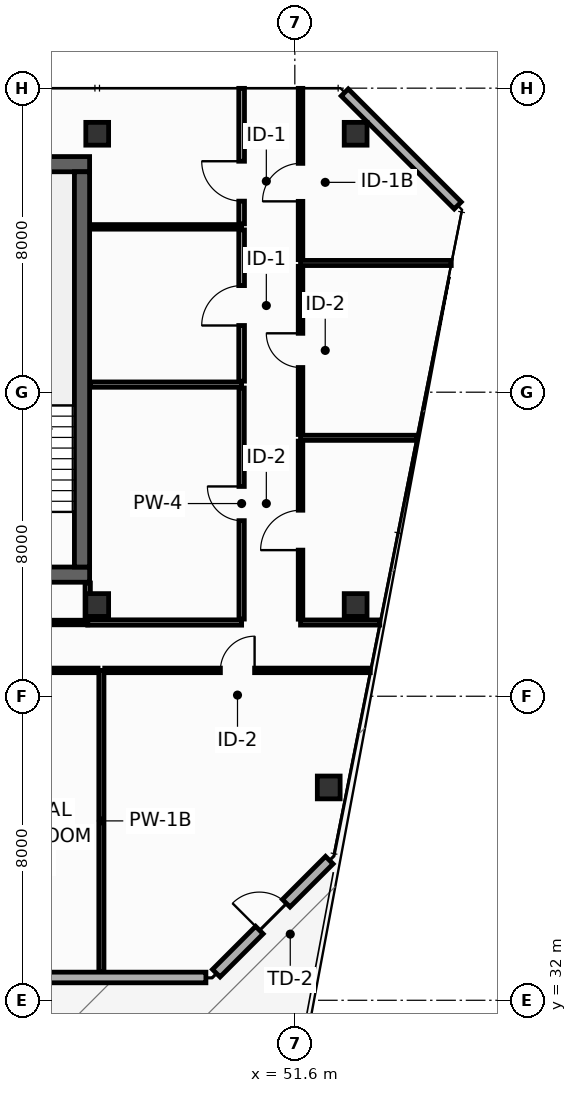
"""IFC4 building model, lengths in metres.
Left out: names, types, materials, properties, quantities, classifications, styles, units other than length and angle.
Written with IfcOpenShell. Run it as: python <this file> out.ifc"""

import sys

from ifc_helpers import new_model, si_unit, direction, frame, frame_2d, origin, origin_2d, place, context, subcontext, project, spatial, rectangle, hollow_rectangle, extrude, element, fill, save


model = new_model("IFC4")
c1 = context("Model", 3, precision=1e-05, world=origin(), true_north=direction((0.0, 1.0)))
c2 = subcontext(c1, "Body", "Model", "MODEL_VIEW")
j1 = project(units=[si_unit("LENGTHUNIT", "METRE"), si_unit("PLANEANGLEUNIT", "RADIAN")], contexts=[c1])
p1 = place(None, origin())
s1 = spatial("IfcSite", under=j1, at=p1, CompositionType="ELEMENT")
p2 = place(p1, origin())
s2 = spatial("IfcBuilding", under=s1, at=p2, CompositionType="ELEMENT")
p3 = place(p2, frame((0.0, 0.0, 295.2)))
s3 = spatial("IfcBuildingStorey", under=s2, at=p3, CompositionType="ELEMENT", Elevation=295.2)
p4 = place(p3, frame((13.7, 43.2, 0.0), z_axis=(0.0, 0.0, 1.0), x_axis=(1.0, 0.0, 0.0)))
e1 = element("IfcWall", 1, at=p4, inside=s3, PredefinedType="SHEAR", context=c2, shape_type="SweptSolid", body=[
    extrude(rectangle(XDim=32.5, YDim=0.4, at=frame_2d((16.25, 0.0))), origin(), (0.0, 0.0, 1.0), 3.55),
])
p5 = place(p4, frame((5.4, 0.0, 0.0)))
e2 = element("IfcOpeningElement", 2, at=p5, cuts=e1, PredefinedType="OPENING", context=c2, shape_type="SweptSolid", body=[
    extrude(rectangle(XDim=1.1, YDim=2.15, at=frame_2d((0.55, 1.075))), frame((0.0, 0.21, 0.0), z_axis=(0.0, -1.0, 0.0), x_axis=(1.0, 0.0, 0.0)), (0.0, 0.0, 1.0), 0.42),
])
p6 = place(p4, frame((25.6, 0.0, 0.0)))
e3 = element("IfcOpeningElement", 3, at=p6, cuts=e1, PredefinedType="OPENING", context=c2, shape_type="SweptSolid", body=[
    extrude(rectangle(XDim=1.1, YDim=2.15, at=frame_2d((0.55, 1.075))), frame((0.0, 0.21, 0.0), z_axis=(0.0, -1.0, 0.0), x_axis=(1.0, 0.0, 0.0)), (0.0, 0.0, 1.0), 0.42),
])
p7 = place(p3, frame((13.7, 54.0, 0.0), z_axis=(0.0, 0.0, 1.0), x_axis=(1.0, 0.0, 0.0)))
e4 = element("IfcWall", 4, at=p7, inside=s3, PredefinedType="SHEAR", context=c2, shape_type="SweptSolid", body=[
    extrude(rectangle(XDim=32.5, YDim=0.4, at=frame_2d((16.25, 0.0))), origin(), (0.0, 0.0, 1.0), 3.55),
])
p8 = place(p3, frame((46.0, 43.4, 0.0), z_axis=(0.0, 0.0, 1.0), x_axis=(0.0, 1.0, 0.0)))
e5 = element("IfcWall", 5, at=p8, inside=s3, PredefinedType="SHEAR", context=c2, shape_type="SweptSolid", body=[
    extrude(rectangle(XDim=10.4, YDim=0.4, at=frame_2d((5.2, 0.0))), origin(), (0.0, 0.0, 1.0), 3.55),
])
for number, where, z_axis, x_axis in (
    (6, (46.4, 54.8, 0.0), (0.0, 0.0, 1.0), (1.0, 0.0, 0.0)),
    (7, (53.2, 54.8, 0.0), (0.0, 0.0, 1.0), (1.0, 0.0, 0.0)),
    (8, (46.4, 42.4, 0.0), (0.0, 0.0, 1.0), (1.0, 0.0, 0.0)),
    (9, (53.2, 42.4, 0.0), (0.0, 0.0, 1.0), (1.0, 0.0, 0.0)),
    (10, (52.492, 37.6, 0.0), (0.0, 0.0, 1.0), (1.0, 0.0, 0.0)),
):
    element("IfcColumn", number, at=place(p3, frame(where, z_axis=z_axis, x_axis=x_axis)), inside=s3, PredefinedType="COLUMN", context=c2, shape_type="SweptSolid", body=[
        extrude(hollow_rectangle(XDim=0.6, YDim=0.6, WallThickness=0.028, at=origin_2d()), origin(), (0.0, 0.0, 1.0), 3.8),
    ])
p9 = place(p3, frame((35.66, 32.6, 0.0), z_axis=(0.0, 0.0, 1.0), x_axis=(1.0, 0.0, 0.0)))
e11 = element("IfcWall", 11, at=p9, inside=s3, PredefinedType="STANDARD", context=c2, shape_type="SweptSolid", body=[
    extrude(rectangle(XDim=13.6, YDim=0.28, at=frame_2d((6.8, 0.0))), origin(), (0.0, 0.0, 1.0), 3.55),
])
p10 = place(p9, frame((6.3, 0.0, 0.0)))
e12 = element("IfcOpeningElement", 12, at=p10, cuts=e11, PredefinedType="OPENING", context=c2, shape_type="SweptSolid", body=[
    extrude(rectangle(XDim=1.0, YDim=2.2, at=frame_2d((0.5, 1.1))), frame((0.0, 0.15, 0.0), z_axis=(0.0, -1.0, 0.0), x_axis=(1.0, 0.0, 0.0)), (0.0, 0.0, 1.0), 0.3),
])
p11 = place(p3, frame((49.533, 32.713, 0.0), z_axis=(0.0, 0.0, 1.0), x_axis=(0.70707775441, 0.707135806771, 0.0)))
e13 = element("IfcWall", 13, at=p11, inside=s3, PredefinedType="STANDARD", context=c2, shape_type="SweptSolid", body=[
    extrude(rectangle(XDim=4.206, YDim=0.28, at=frame_2d((2.103, 0.0))), origin(), (0.0, 0.0, 1.0), 3.55),
])
p12 = place(p11, frame((1.603, 0.0, 0.0)))
e14 = element("IfcOpeningElement", 14, at=p12, cuts=e13, PredefinedType="OPENING", context=c2, shape_type="SweptSolid", body=[
    extrude(rectangle(XDim=1.0, YDim=2.2, at=frame_2d((0.5, 1.1))), frame((0.0, 0.15, 0.0), z_axis=(0.0, -1.0, 0.0), x_axis=(1.0, 0.0, 0.0)), (0.0, 0.0, 1.0), 0.3),
])
p13 = place(p3, frame((55.887, 52.913, 0.0), z_axis=(0.0, 0.0, 1.0), x_axis=(-0.707106781187, 0.707106781187, 0.0)))
e15 = element("IfcWall", 15, at=p13, inside=s3, PredefinedType="STANDARD", context=c2, shape_type="SweptSolid", body=[
    extrude(rectangle(XDim=4.206, YDim=0.26, at=frame_2d((2.103, 0.0))), origin(), (0.0, 0.0, 1.0), 3.55),
])
p14 = place(p3, frame((46.15, 41.94, 0.0), z_axis=(0.0, 0.0, 1.0), x_axis=(1.0, 0.0, 0.0)))
e16 = element("IfcWall", 16, at=p14, inside=s3, PredefinedType="PARTITIONING", context=c2, shape_type="SweptSolid", body=[
    extrude(rectangle(XDim=4.05, YDim=0.14, at=frame_2d((2.025, 0.0))), origin(), (0.0, 0.0, 1.0), 3.55),
])
p15 = place(p3, frame((46.15, 42.03, 0.0), z_axis=(0.0, 0.0, 1.0), x_axis=(0.0, 1.0, 0.0)))
e17 = element("IfcWall", 17, at=p15, inside=s3, PredefinedType="PARTITIONING", context=c2, shape_type="SweptSolid", body=[
    extrude(rectangle(XDim=0.95, YDim=0.14, at=frame_2d((0.475, 0.0))), origin(), (0.0, 0.0, 1.0), 3.55),
])
p16 = place(p3, frame((46.22, 48.2, 0.0), z_axis=(0.0, 0.0, 1.0), x_axis=(1.0, 0.0, 0.0)))
e18 = element("IfcWall", 18, at=p16, inside=s3, PredefinedType="PARTITIONING", context=c2, shape_type="SweptSolid", body=[
    extrude(rectangle(XDim=3.98, YDim=0.14, at=frame_2d((1.99, 0.0))), origin(), (0.0, 0.0, 1.0), 3.55),
])
p17 = place(p3, frame((50.2, 42.03, 0.0), z_axis=(0.0, 0.0, 1.0), x_axis=(0.0, 1.0, 0.0)))
e19 = element("IfcWall", 19, at=p17, inside=s3, PredefinedType="PARTITIONING", context=c2, shape_type="SweptSolid", body=[
    extrude(rectangle(XDim=6.08, YDim=0.14, at=frame_2d((3.04, 0.0))), origin(), (0.0, 0.0, 1.0), 2.947),
])
p18 = place(p17, frame((2.59, 0.0, 0.0)))
e20 = element("IfcOpeningElement", 20, at=p18, cuts=e19, PredefinedType="OPENING", context=c2, shape_type="SweptSolid", body=[
    extrude(rectangle(XDim=0.9, YDim=2.1, at=frame_2d((0.45, 1.05))), frame((0.0, 0.08, 0.0), z_axis=(0.0, -1.0, 0.0), x_axis=(1.0, 0.0, 0.0)), (0.0, 0.0, 1.0), 0.16),
])
p19 = place(p3, frame((46.22, 52.35, 0.0), z_axis=(0.0, 0.0, 1.0), x_axis=(1.0, 0.0, 0.0)))
e21 = element("IfcWall", 21, at=p19, inside=s3, PredefinedType="PARTITIONING", context=c2, shape_type="SweptSolid", body=[
    extrude(rectangle(XDim=3.98, YDim=0.12, at=frame_2d((1.99, 0.0))), origin(), (0.0, 0.0, 1.0), 3.55),
])
p20 = place(p3, frame((50.2, 48.29, 0.0), z_axis=(0.0, 0.0, 1.0), x_axis=(0.0, 1.0, 0.0)))
e22 = element("IfcWall", 22, at=p20, inside=s3, PredefinedType="PARTITIONING", context=c2, shape_type="SweptSolid", body=[
    extrude(rectangle(XDim=3.98, YDim=0.15, at=frame_2d((1.99, 0.0))), origin(), (0.0, 0.0, 1.0), 3.55),
])
p21 = place(p20, frame((1.465, 0.0, 0.0)))
e23 = element("IfcOpeningElement", 23, at=p21, cuts=e22, PredefinedType="OPENING", context=c2, shape_type="SweptSolid", body=[
    extrude(rectangle(XDim=1.05, YDim=2.15, at=frame_2d((0.525, 1.075))), frame((0.0, 0.085, 0.0), z_axis=(0.0, -1.0, 0.0), x_axis=(1.0, 0.0, 0.0)), (0.0, 0.0, 1.0), 0.17),
])
p22 = place(p3, frame((50.2, 52.43, 0.0), z_axis=(0.0, 0.0, 1.0), x_axis=(0.0, 1.0, 0.0)))
e24 = element("IfcWall", 24, at=p22, inside=s3, PredefinedType="PARTITIONING", context=c2, shape_type="SweptSolid", body=[
    extrude(rectangle(XDim=3.565, YDim=0.15, at=frame_2d((1.783, 0.0))), origin(), (0.0, 0.0, 1.0), 2.935),
])
p23 = place(p22, frame((0.597, 0.0, 0.0)))
e25 = element("IfcOpeningElement", 25, at=p23, cuts=e24, PredefinedType="OPENING", context=c2, shape_type="SweptSolid", body=[
    extrude(rectangle(XDim=1.05, YDim=2.15, at=frame_2d((0.525, 1.075))), frame((0.0, 0.085, 0.0), z_axis=(0.0, -1.0, 0.0), x_axis=(1.0, 0.0, 0.0)), (0.0, 0.0, 1.0), 0.17),
])
p24 = place(p3, frame((51.75, 41.94, 0.0), z_axis=(0.0, 0.0, 1.0), x_axis=(1.0, 0.0, 0.0)))
e26 = element("IfcWall", 26, at=p24, inside=s3, PredefinedType="PARTITIONING", context=c2, shape_type="SweptSolid", body=[
    extrude(rectangle(XDim=2.086, YDim=0.135, at=frame_2d((1.043, 0.0))), origin(), (0.0, 0.0, 1.0), 3.085),
])
p25 = place(p3, frame((51.75, 46.8, 0.0), z_axis=(0.0, 0.0, 1.0), x_axis=(1.0, 0.0, 0.0)))
e27 = element("IfcWall", 27, at=p25, inside=s3, PredefinedType="PARTITIONING", context=c2, shape_type="SweptSolid", body=[
    extrude(rectangle(XDim=3.052, YDim=0.135, at=frame_2d((1.526, 0.0))), origin(), (0.0, 0.0, 1.0), 2.947),
])
p26 = place(p3, frame((51.75, 51.4, 0.0), z_axis=(0.0, 0.0, 1.0), x_axis=(1.0, 0.0, 0.0)))
e28 = element("IfcWall", 28, at=p26, inside=s3, PredefinedType="PARTITIONING", context=c2, shape_type="SweptSolid", body=[
    extrude(rectangle(XDim=3.967, YDim=0.135, at=frame_2d((1.983, 0.0))), origin(), (0.0, 0.0, 1.0), 2.947),
])
p27 = place(p3, frame((51.75, 42.028, 0.0), z_axis=(0.0, 0.0, 1.0), x_axis=(0.0, 1.0, 0.0)))
e29 = element("IfcWall", 29, at=p27, inside=s3, PredefinedType="PARTITIONING", context=c2, shape_type="SweptSolid", body=[
    extrude(rectangle(XDim=4.685, YDim=0.12, at=frame_2d((2.342, 0.0))), origin(), (0.0, 0.0, 1.0), 2.947),
])
p28 = place(p27, frame((1.817, 0.0, 0.0)))
e30 = element("IfcOpeningElement", 30, at=p28, cuts=e29, PredefinedType="OPENING", context=c2, shape_type="SweptSolid", body=[
    extrude(rectangle(XDim=1.05, YDim=2.15, at=frame_2d((0.525, 1.075))), frame((0.0, 0.07, 0.0), z_axis=(0.0, -1.0, 0.0), x_axis=(1.0, 0.0, 0.0)), (0.0, 0.0, 1.0), 0.14),
])
p29 = place(p3, frame((51.75, 46.887, 0.0), z_axis=(0.0, 0.0, 1.0), x_axis=(0.0, 1.0, 0.0)))
e31 = element("IfcWall", 31, at=p29, inside=s3, PredefinedType="PARTITIONING", context=c2, shape_type="SweptSolid", body=[
    extrude(rectangle(XDim=4.425, YDim=0.12, at=frame_2d((2.212, 0.0))), origin(), (0.0, 0.0, 1.0), 3.55),
])
p30 = place(p29, frame((1.762, 0.0, 0.0)))
e32 = element("IfcOpeningElement", 32, at=p30, cuts=e31, PredefinedType="OPENING", context=c2, shape_type="SweptSolid", body=[
    extrude(rectangle(XDim=0.9, YDim=2.1, at=frame_2d((0.45, 1.05))), frame((0.0, 0.07, 0.0), z_axis=(0.0, -1.0, 0.0), x_axis=(1.0, 0.0, 0.0)), (0.0, 0.0, 1.0), 0.14),
])
p31 = place(p3, frame((51.75, 51.488, 0.0), z_axis=(0.0, 0.0, 1.0), x_axis=(0.0, 1.0, 0.0)))
e33 = element("IfcWall", 33, at=p31, inside=s3, PredefinedType="PARTITIONING", context=c2, shape_type="SweptSolid", body=[
    extrude(rectangle(XDim=4.508, YDim=0.12, at=frame_2d((2.254, 0.0))), origin(), (0.0, 0.0, 1.0), 2.935),
])
p32 = place(p31, frame((1.534, 0.0, 0.0)))
e34 = element("IfcOpeningElement", 34, at=p32, cuts=e33, PredefinedType="OPENING", context=c2, shape_type="SweptSolid", body=[
    extrude(rectangle(XDim=1.0, YDim=2.15, at=frame_2d((0.5, 1.075))), frame((0.0, 0.07, 0.0), z_axis=(0.0, -1.0, 0.0), x_axis=(1.0, 0.0, 0.0)), (0.0, 0.0, 1.0), 0.14),
])
p33 = place(p3, frame((40.995, 41.94, 0.0), z_axis=(0.0, 0.0, 1.0), x_axis=(1.0, 0.0, 0.0)))
e35 = element("IfcWall", 35, at=p33, inside=s3, PredefinedType="PARTITIONING", context=c2, shape_type="SweptSolid", body=[
    extrude(rectangle(XDim=5.155, YDim=0.12, at=frame_2d((2.577, 0.0))), origin(), (0.0, 0.0, 1.0), 3.55),
])
p34 = place(p33, frame((2.053, 0.0, 0.0)))
e36 = element("IfcOpeningElement", 36, at=p34, cuts=e35, PredefinedType="OPENING", context=c2, shape_type="SweptSolid", body=[
    extrude(rectangle(XDim=1.05, YDim=2.15, at=frame_2d((0.525, 1.075))), frame((0.0, 0.07, 0.0), z_axis=(0.0, -1.0, 0.0), x_axis=(1.0, 0.0, 0.0)), (0.0, 0.0, 1.0), 0.14),
])
p35 = place(p3, frame((46.51, 32.76, 0.0), z_axis=(0.0, 0.0, 1.0), x_axis=(0.0, 1.0, 0.0)))
e37 = element("IfcWall", 37, at=p35, inside=s3, PredefinedType="PARTITIONING", context=c2, shape_type="SweptSolid", body=[
    extrude(rectangle(XDim=7.92, YDim=0.135, at=frame_2d((3.96, 0.0))), origin(), (0.0, 0.0, 1.0), 3.047),
])
p36 = place(p3, frame((37.16, 40.68, 0.0), z_axis=(0.0, 0.0, 1.0), x_axis=(1.0, 0.0, 0.0)))
e38 = element("IfcWall", 38, at=p36, inside=s3, PredefinedType="PARTITIONING", context=c2, shape_type="SweptSolid", body=[
    extrude(rectangle(XDim=9.263, YDim=0.12, at=frame_2d((4.631, 0.0))), origin(), (0.0, 0.0, 1.0), 3.047),
])
p37 = place(p36, frame((4.106, 0.0, 0.0)))
e39 = element("IfcOpeningElement", 39, at=p37, cuts=e38, PredefinedType="OPENING", context=c2, shape_type="SweptSolid", body=[
    extrude(rectangle(XDim=1.05, YDim=2.15, at=frame_2d((0.525, 1.075))), frame((0.0, 0.07, 0.0), z_axis=(0.0, -1.0, 0.0), x_axis=(1.0, 0.0, 0.0)), (0.0, 0.0, 1.0), 0.14),
])
p38 = place(p3, frame((46.597, 40.68, 0.0), z_axis=(0.0, 0.0, 1.0), x_axis=(1.0, 0.0, 0.0)))
e40 = element("IfcWall", 40, at=p38, inside=s3, PredefinedType="PARTITIONING", context=c2, shape_type="SweptSolid", body=[
    extrude(rectangle(XDim=6.988, YDim=0.12, at=frame_2d((3.494, 0.0))), origin(), (0.0, 0.0, 1.0), 3.085),
])
p39 = place(p38, frame((3.044, 0.0, 0.0)))
e41 = element("IfcOpeningElement", 41, at=p39, cuts=e40, PredefinedType="OPENING", context=c2, shape_type="SweptSolid", body=[
    extrude(rectangle(XDim=0.9, YDim=2.1, at=frame_2d((0.45, 1.05))), frame((0.0, 0.07, 0.0), z_axis=(0.0, -1.0, 0.0), x_axis=(1.0, 0.0, 0.0)), (0.0, 0.0, 1.0), 0.14),
])
p40 = place(p12, origin())
e42 = element("IfcDoor", 42, at=p40, inside=s3, OperationType="SINGLE_SWING_LEFT", PredefinedType="DOOR", context=c2, shape_type="SweptSolid", body=[
    extrude(rectangle(XDim=1.0, YDim=2.2, at=frame_2d((0.5, 1.1))), frame((0.0, 0.025, 0.0), z_axis=(0.0, -1.0, 0.0), x_axis=(1.0, 0.0, 0.0)), (0.0, 0.0, 1.0), 0.05),
])
fill(e14, e42)
p41 = place(p18, origin())
e43 = element("IfcDoor", 43, at=p41, inside=s3, OperationType="SINGLE_SWING_RIGHT", PredefinedType="DOOR", context=c2, shape_type="SweptSolid", body=[
    extrude(rectangle(XDim=0.9, YDim=2.1, at=frame_2d((0.45, 1.05))), frame((0.0, 0.025, 0.0), z_axis=(0.0, -1.0, 0.0), x_axis=(1.0, 0.0, 0.0)), (0.0, 0.0, 1.0), 0.05),
])
fill(e20, e43)
p42 = place(p21, origin())
e44 = element("IfcDoor", 44, at=p42, inside=s3, OperationType="SINGLE_SWING_LEFT", PredefinedType="DOOR", context=c2, shape_type="SweptSolid", body=[
    extrude(rectangle(XDim=1.05, YDim=2.15, at=frame_2d((0.525, 1.075))), frame((0.0, 0.025, 0.0), z_axis=(0.0, -1.0, 0.0), x_axis=(1.0, 0.0, 0.0)), (0.0, 0.0, 1.0), 0.05),
])
fill(e23, e44)
p43 = place(p23, origin())
e45 = element("IfcDoor", 45, at=p43, inside=s3, OperationType="SINGLE_SWING_RIGHT", PredefinedType="DOOR", context=c2, shape_type="SweptSolid", body=[
    extrude(rectangle(XDim=1.05, YDim=2.15, at=frame_2d((0.525, 1.075))), frame((0.0, 0.025, 0.0), z_axis=(0.0, -1.0, 0.0), x_axis=(1.0, 0.0, 0.0)), (0.0, 0.0, 1.0), 0.05),
])
fill(e25, e45)
p44 = place(p28, origin())
e46 = element("IfcDoor", 46, at=p44, inside=s3, OperationType="SINGLE_SWING_LEFT", PredefinedType="DOOR", context=c2, shape_type="SweptSolid", body=[
    extrude(rectangle(XDim=1.05, YDim=2.15, at=frame_2d((0.525, 1.075))), frame((0.0, 0.025, 0.0), z_axis=(0.0, -1.0, 0.0), x_axis=(1.0, 0.0, 0.0)), (0.0, 0.0, 1.0), 0.05),
])
fill(e30, e46)
p45 = place(p30, origin())
e47 = element("IfcDoor", 47, at=p45, inside=s3, OperationType="SINGLE_SWING_RIGHT", PredefinedType="DOOR", context=c2, shape_type="SweptSolid", body=[
    extrude(rectangle(XDim=0.9, YDim=2.1, at=frame_2d((0.45, 1.05))), frame((0.0, 0.025, 0.0), z_axis=(0.0, -1.0, 0.0), x_axis=(1.0, 0.0, 0.0)), (0.0, 0.0, 1.0), 0.05),
])
fill(e32, e47)
p46 = place(p32, origin())
e48 = element("IfcDoor", 48, at=p46, inside=s3, OperationType="SINGLE_SWING_LEFT", PredefinedType="DOOR", context=c2, shape_type="SweptSolid", body=[
    extrude(rectangle(XDim=1.0, YDim=2.15, at=frame_2d((0.5, 1.075))), frame((0.0, 0.025, 0.0), z_axis=(0.0, -1.0, 0.0), x_axis=(1.0, 0.0, 0.0)), (0.0, 0.0, 1.0), 0.05),
])
fill(e34, e48)
p47 = place(p39, origin())
e49 = element("IfcDoor", 49, at=p47, inside=s3, OperationType="SINGLE_SWING_RIGHT", PredefinedType="DOOR", context=c2, shape_type="SweptSolid", body=[
    extrude(rectangle(XDim=0.9, YDim=2.1, at=frame_2d((0.45, 1.05))), frame((0.0, 0.025, 0.0), z_axis=(0.0, -1.0, 0.0), x_axis=(1.0, 0.0, 0.0)), (0.0, 0.0, 1.0), 0.05),
])
fill(e41, e49)
save(model, sys.argv[1])
